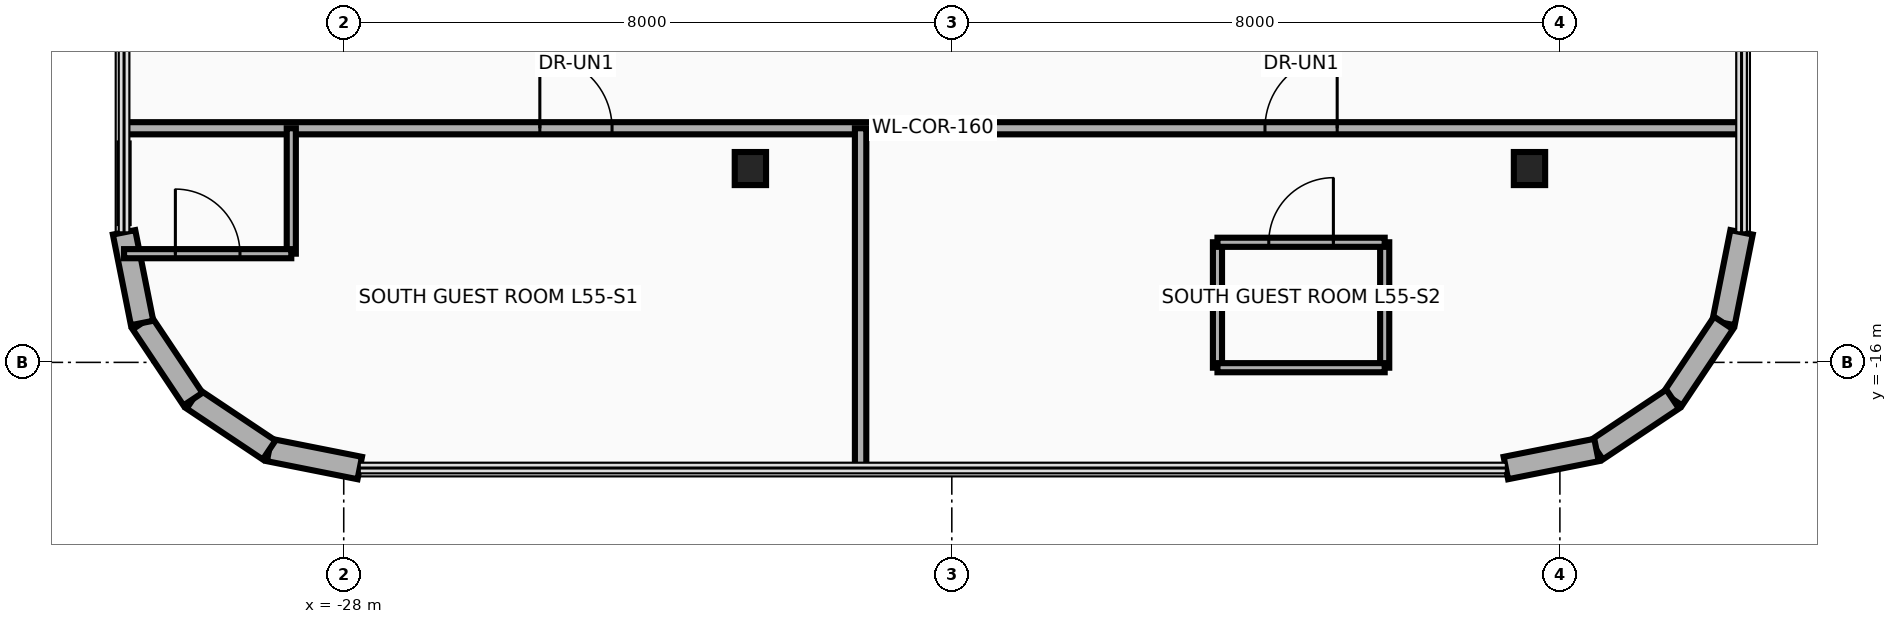
"""IFC4 building model, lengths in metres.
Left out: names, types, materials, properties, quantities, classifications, styles, units other than length and angle.
Written with IfcOpenShell. Run it as: python <this file> out.ifc"""

import sys

from ifc_helpers import new_model, si_unit, direction, frame, frame_2d, origin, origin_2d, place, context, subcontext, project, spatial, rectangle, i_section, extrude, source, transform, mapped, element, fill, save


model = new_model("IFC4")
c1 = context("Model", 3, precision=1e-05, world=origin(), true_north=direction((0.0, 1.0)))
c2 = subcontext(c1, "Body", "Model", "MODEL_VIEW")
j1 = project(units=[si_unit("LENGTHUNIT", "METRE"), si_unit("PLANEANGLEUNIT", "RADIAN")], contexts=[c1])
p1 = place(None, origin())
s1 = spatial("IfcSite", under=j1, at=p1, CompositionType="ELEMENT")
p2 = place(p1, origin())
s2 = spatial("IfcBuilding", under=s1, at=p2, CompositionType="ELEMENT")
p3 = place(p2, frame((0.0, 0.0, 216.0)))
s3 = spatial("IfcBuildingStorey", under=s2, at=p3, CompositionType="ELEMENT", Elevation=216.0)
m1 = source(origin(), c2, "Body", "SweptSolid", [
    extrude(i_section(OverallWidth=0.412, OverallDepth=0.435, WebThickness=0.036, FlangeThickness=0.057, at=origin_2d()), origin(), (0.0, 0.0, 1.0), 3.5),
])
for number, where, z_axis, x_axis in (
    (1, (-22.65, -13.45, 0.0), (0.0, 0.0, 1.0), (1.0, 0.0, 0.0)),
    (2, (-12.4, -13.45, 0.0), (0.0, 0.0, 1.0), (1.0, 0.0, 0.0)),
):
    element("IfcColumn", number, at=place(p3, frame(where, z_axis=z_axis, x_axis=x_axis)), inside=s3, PredefinedType="COLUMN", context=c2, shape_type="MappedRepresentation", body=[
        mapped(m1, transform((0.0, 0.0, 0.0), x_axis=(1.0, 0.0, 0.0), y_axis=(0.0, 1.0, 0.0), z_axis=(0.0, 0.0, 1.0), scale=1.0)),
    ])
p4 = place(p3, frame((-9.61, -14.289, 0.0), z_axis=(0.0, 0.0, 1.0), x_axis=(-0.194996050505, -0.980804027463, 0.0)))
e3 = element("IfcWall", 3, at=p4, inside=s3, PredefinedType="SOLIDWALL", context=c2, shape_type="SweptSolid", body=[
    extrude(rectangle(XDim=1.216, YDim=0.3, at=frame_2d((0.608, 0.0))), origin(), (0.0, 0.0, 1.0), 3.26),
])
for number, where, z_axis, x_axis in (
    (4, (-9.847, -15.482, 0.0), (0.0, 0.0, 1.0), (-0.556, -0.831, 0.0)),
    (5, (-10.517, -16.483, 0.0), (0.0, 0.0, 1.0), (-0.831, -0.556, 0.0)),
):
    element("IfcWall", number, at=place(p3, frame(where, z_axis=z_axis, x_axis=x_axis)), inside=s3, PredefinedType="SOLIDWALL", context=c2, shape_type="SweptSolid", body=[
        extrude(rectangle(XDim=1.205, YDim=0.3, at=frame_2d((0.603, 0.0))), origin(), (0.0, 0.0, 1.0), 3.26),
    ])
for number, where, z_axis, x_axis in (
    (6, (-11.518, -17.153, 0.0), (0.0, 0.0, 1.0), (-0.981, -0.195, 0.0)),
    (7, (-27.789, -17.39, 0.0), (0.0, 0.0, 1.0), (-0.981, 0.195, 0.0)),
):
    element("IfcWall", number, at=place(p3, frame(where, z_axis=z_axis, x_axis=x_axis)), inside=s3, PredefinedType="SOLIDWALL", context=c2, shape_type="SweptSolid", body=[
        extrude(rectangle(XDim=1.216, YDim=0.3, at=frame_2d((0.608, 0.0))), origin(), (0.0, 0.0, 1.0), 3.26),
    ])
for number, where, z_axis, x_axis in (
    (8, (-28.982, -17.153, 0.0), (0.0, 0.0, 1.0), (-0.831, 0.556, 0.0)),
    (9, (-29.983, -16.483, 0.0), (0.0, 0.0, 1.0), (-0.556, 0.831, 0.0)),
):
    element("IfcWall", number, at=place(p3, frame(where, z_axis=z_axis, x_axis=x_axis)), inside=s3, PredefinedType="SOLIDWALL", context=c2, shape_type="SweptSolid", body=[
        extrude(rectangle(XDim=1.205, YDim=0.3, at=frame_2d((0.603, 0.0))), origin(), (0.0, 0.0, 1.0), 3.26),
    ])
p5 = place(p3, frame((-30.653, -15.482, 0.0), z_axis=(0.0, 0.0, 1.0), x_axis=(-0.194996050505, 0.980804027463, 0.0)))
e10 = element("IfcWall", 10, at=p5, inside=s3, PredefinedType="SOLIDWALL", context=c2, shape_type="SweptSolid", body=[
    extrude(rectangle(XDim=1.216, YDim=0.3, at=frame_2d((0.608, 0.0))), origin(), (0.0, 0.0, 1.0), 3.26),
])
p6 = place(p3, frame((-30.89, -12.92, 0.0), z_axis=(0.0, 0.0, 1.0), x_axis=(1.0, 0.0, 0.0)))
e11 = element("IfcWall", 11, at=p6, inside=s3, PredefinedType="PARTITIONING", context=c2, shape_type="SweptSolid", body=[
    extrude(rectangle(XDim=21.28, YDim=0.16, at=frame_2d((10.64, 0.0))), origin(), (0.0, 0.0, 1.0), 2.634),
])
p7 = place(p6, frame((5.47, 0.0, 0.0)))
e12 = element("IfcOpeningElement", 12, at=p7, cuts=e11, PredefinedType="OPENING", context=c2, shape_type="SweptSolid", body=[
    extrude(rectangle(XDim=0.95, YDim=2.15, at=frame_2d((0.475, 1.075))), frame((0.0, 0.095, 0.0), z_axis=(0.0, -1.0, 0.0), x_axis=(1.0, 0.0, 0.0)), (0.0, 0.0, 1.0), 0.19),
])
p8 = place(p6, frame((15.01, 0.0, 0.0)))
e13 = element("IfcOpeningElement", 13, at=p8, cuts=e11, PredefinedType="OPENING", context=c2, shape_type="SweptSolid", body=[
    extrude(rectangle(XDim=0.95, YDim=2.15, at=frame_2d((0.475, 1.075))), frame((0.0, 0.095, 0.0), z_axis=(0.0, -1.0, 0.0), x_axis=(1.0, 0.0, 0.0)), (0.0, 0.0, 1.0), 0.19),
])
p9 = place(p3, frame((-21.2, -17.39, 0.0), z_axis=(0.0, 0.0, 1.0), x_axis=(0.0, 1.0, 0.0)))
e14 = element("IfcWall", 14, at=p9, inside=s3, PredefinedType="PARTITIONING", context=c2, shape_type="SweptSolid", body=[
    extrude(rectangle(XDim=4.47, YDim=0.15, at=frame_2d((2.235, 0.0))), origin(), (0.0, 0.0, 1.0), 2.706),
])
p10 = place(p3, frame((-28.69, -14.57, 0.0), z_axis=(0.0, 0.0, 1.0), x_axis=(0.0, 1.0, 0.0)))
e15 = element("IfcWall", 15, at=p10, inside=s3, PredefinedType="PARTITIONING", context=c2, shape_type="SweptSolid", body=[
    extrude(rectangle(XDim=1.65, YDim=0.12, at=frame_2d((0.825, 0.0))), origin(), (0.0, 0.0, 1.0), 3.26),
])
p11 = place(p3, frame((-30.89, -14.57, 0.0), z_axis=(0.0, 0.0, 1.0), x_axis=(1.0, 0.0, 0.0)))
e16 = element("IfcWall", 16, at=p11, inside=s3, PredefinedType="PARTITIONING", context=c2, shape_type="SweptSolid", body=[
    extrude(rectangle(XDim=2.2, YDim=0.12, at=frame_2d((1.1, 0.0))), origin(), (0.0, 0.0, 1.0), 3.26),
])
p12 = place(p11, frame((0.675, 0.0, 0.0)))
e17 = element("IfcOpeningElement", 17, at=p12, cuts=e16, PredefinedType="OPENING", context=c2, shape_type="SweptSolid", body=[
    extrude(rectangle(XDim=0.85, YDim=2.1, at=frame_2d((0.425, 1.05))), frame((0.0, 0.075, 0.0), z_axis=(0.0, -1.0, 0.0), x_axis=(1.0, 0.0, 0.0)), (0.0, 0.0, 1.0), 0.15),
])
p13 = place(p3, frame((-30.89, -14.167, 0.0), z_axis=(0.0, 0.0, 1.0), x_axis=(0.0, 1.0, 0.0)))
e18 = element("IfcWall", 18, at=p13, inside=s3, PredefinedType="PARTITIONING", context=c2, shape_type="SweptSolid", body=[
    extrude(rectangle(XDim=1.047, YDim=0.12, at=frame_2d((0.523, 0.0))), origin(), (0.0, 0.0, 1.0), 3.26),
])
for number, where, z_axis, x_axis in (
    (19, (-16.505, -16.07, 0.0), (0.0, 0.0, 1.0), (0.0, 1.0, 0.0)),
    (20, (-14.305, -16.07, 0.0), (0.0, 0.0, 1.0), (0.0, 1.0, 0.0)),
):
    element("IfcWall", number, at=place(p3, frame(where, z_axis=z_axis, x_axis=x_axis)), inside=s3, PredefinedType="PARTITIONING", context=c2, shape_type="SweptSolid", body=[
        extrude(rectangle(XDim=1.65, YDim=0.12, at=frame_2d((0.825, 0.0))), origin(), (0.0, 0.0, 1.0), 3.26),
    ])
p14 = place(p3, frame((-16.505, -16.07, 0.0), z_axis=(0.0, 0.0, 1.0), x_axis=(1.0, 0.0, 0.0)))
e21 = element("IfcWall", 21, at=p14, inside=s3, PredefinedType="PARTITIONING", context=c2, shape_type="SweptSolid", body=[
    extrude(rectangle(XDim=2.2, YDim=0.12, at=frame_2d((1.1, 0.0))), origin(), (0.0, 0.0, 1.0), 3.26),
])
p15 = place(p3, frame((-16.505, -14.42, 0.0), z_axis=(0.0, 0.0, 1.0), x_axis=(1.0, 0.0, 0.0)))
e22 = element("IfcWall", 22, at=p15, inside=s3, PredefinedType="PARTITIONING", context=c2, shape_type="SweptSolid", body=[
    extrude(rectangle(XDim=2.2, YDim=0.12, at=frame_2d((1.1, 0.0))), origin(), (0.0, 0.0, 1.0), 3.26),
])
p16 = place(p15, frame((0.675, 0.0, 0.0)))
e23 = element("IfcOpeningElement", 23, at=p16, cuts=e22, PredefinedType="OPENING", context=c2, shape_type="SweptSolid", body=[
    extrude(rectangle(XDim=0.85, YDim=2.1, at=frame_2d((0.425, 1.05))), frame((0.0, 0.075, 0.0), z_axis=(0.0, -1.0, 0.0), x_axis=(1.0, 0.0, 0.0)), (0.0, 0.0, 1.0), 0.15),
])
p17 = place(p7, origin())
e24 = element("IfcDoor", 24, at=p17, inside=s3, OperationType="SINGLE_SWING_RIGHT", PredefinedType="DOOR", context=c2, shape_type="SweptSolid", body=[
    extrude(rectangle(XDim=0.95, YDim=2.15, at=frame_2d((0.475, 1.075))), frame((0.0, 0.025, 0.0), z_axis=(0.0, -1.0, 0.0), x_axis=(1.0, 0.0, 0.0)), (0.0, 0.0, 1.0), 0.05),
])
fill(e12, e24)
p18 = place(p12, origin())
e25 = element("IfcDoor", 25, at=p18, inside=s3, OperationType="SINGLE_SWING_LEFT", PredefinedType="DOOR", context=c2, shape_type="SweptSolid", body=[
    extrude(rectangle(XDim=0.85, YDim=2.1, at=frame_2d((0.425, 1.05))), frame((0.0, 0.025, 0.0), z_axis=(0.0, -1.0, 0.0), x_axis=(1.0, 0.0, 0.0)), (0.0, 0.0, 1.0), 0.05),
])
fill(e17, e25)
p19 = place(p8, origin())
e26 = element("IfcDoor", 26, at=p19, inside=s3, OperationType="SINGLE_SWING_RIGHT", PredefinedType="DOOR", context=c2, shape_type="SweptSolid", body=[
    extrude(rectangle(XDim=0.95, YDim=2.15, at=frame_2d((0.475, 1.075))), frame((0.0, 0.025, 0.0), z_axis=(0.0, -1.0, 0.0), x_axis=(1.0, 0.0, 0.0)), (0.0, 0.0, 1.0), 0.05),
])
fill(e13, e26)
p20 = place(p16, origin())
e27 = element("IfcDoor", 27, at=p20, inside=s3, OperationType="SINGLE_SWING_LEFT", PredefinedType="DOOR", context=c2, shape_type="SweptSolid", body=[
    extrude(rectangle(XDim=0.85, YDim=2.1, at=frame_2d((0.425, 1.05))), frame((0.0, 0.025, 0.0), z_axis=(0.0, -1.0, 0.0), x_axis=(1.0, 0.0, 0.0)), (0.0, 0.0, 1.0), 0.05),
])
fill(e23, e27)
save(model, sys.argv[1])
